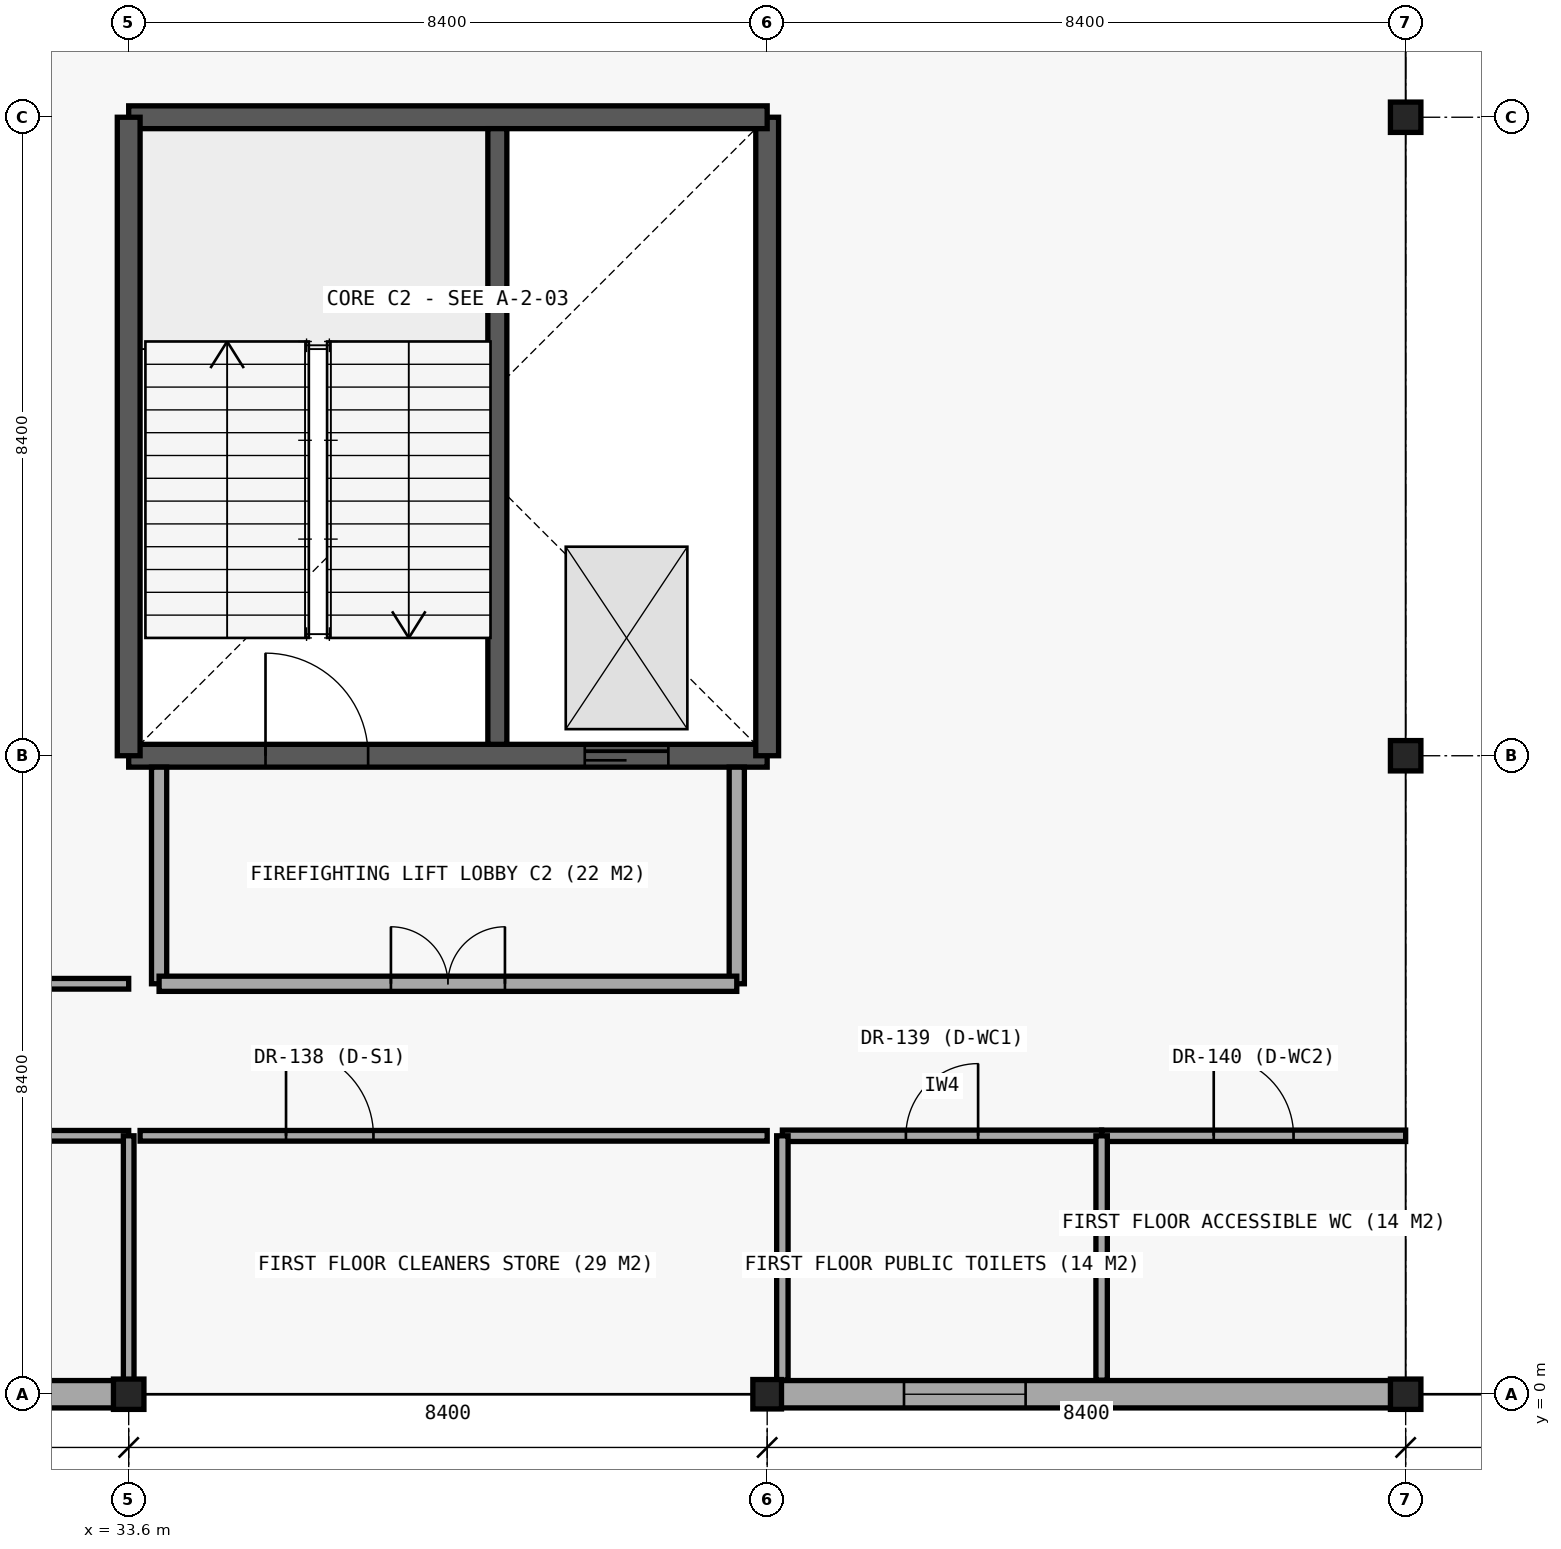
"""IFC4 building model, lengths in metres.
Left out: names, types, materials, properties, quantities, classifications, styles, units other than length and angle.
Written with IfcOpenShell. Run it as: python <this file> out.ifc"""

import sys

from ifc_helpers import new_model, si_unit, direction, frame, frame_2d, origin, origin_2d, place, context, subcontext, project, spatial, rectangle, i_section, extrude, element, fill, save


model = new_model("IFC4")
c1 = context("Model", 3, precision=1e-05, world=origin(), true_north=direction((0.0, 1.0)))
c2 = subcontext(c1, "Body", "Model", "MODEL_VIEW")
j1 = project(units=[si_unit("LENGTHUNIT", "METRE"), si_unit("PLANEANGLEUNIT", "RADIAN")], contexts=[c1])
p1 = place(None, origin())
s1 = spatial("IfcSite", under=j1, at=p1, CompositionType="ELEMENT")
p2 = place(p1, origin())
s2 = spatial("IfcBuilding", under=s1, at=p2, CompositionType="ELEMENT")
p3 = place(p2, frame((0.0, 0.0, 4.8)))
s3 = spatial("IfcBuildingStorey", under=s2, at=p3, CompositionType="ELEMENT", Elevation=4.8)
p4 = place(p3, frame((33.6, 8.4, 0.0), z_axis=(0.0, 0.0, 1.0), x_axis=(1.0, 0.0, 0.0)))
e1 = element("IfcWall", 1, at=p4, inside=s3, PredefinedType="SHEAR", context=c2, shape_type="SweptSolid", body=[
    extrude(rectangle(XDim=8.4, YDim=0.3, at=frame_2d((4.2, 0.0))), origin(), (0.0, 0.0, 1.0), 4.2),
])
p5 = place(p4, frame((1.8, 0.0, 0.0)))
e2 = element("IfcOpeningElement", 2, at=p5, cuts=e1, PredefinedType="OPENING", context=c2, shape_type="SweptSolid", body=[
    extrude(rectangle(XDim=1.35, YDim=2.2, at=frame_2d((0.675, 1.1))), frame((0.0, 0.16, 0.0), z_axis=(0.0, -1.0, 0.0), x_axis=(1.0, 0.0, 0.0)), (0.0, 0.0, 1.0), 0.32),
])
p6 = place(p4, frame((6.0, 0.0, 0.0)))
e3 = element("IfcOpeningElement", 3, at=p6, cuts=e1, PredefinedType="OPENING", context=c2, shape_type="SweptSolid", body=[
    extrude(rectangle(XDim=1.1, YDim=2.2, at=frame_2d((0.55, 1.1))), frame((0.0, 0.16, 0.0), z_axis=(0.0, -1.0, 0.0), x_axis=(1.0, 0.0, 0.0)), (0.0, 0.0, 1.0), 0.32),
])
p7 = place(p3, frame((42.0, 8.4, 0.0), z_axis=(0.0, 0.0, 1.0), x_axis=(0.0, 1.0, 0.0)))
e4 = element("IfcWall", 4, at=p7, inside=s3, PredefinedType="SHEAR", context=c2, shape_type="SweptSolid", body=[
    extrude(rectangle(XDim=8.4, YDim=0.3, at=frame_2d((4.2, 0.0))), origin(), (0.0, 0.0, 1.0), 4.2),
])
p8 = place(p3, frame((42.0, 16.8, 0.0), z_axis=(0.0, 0.0, 1.0), x_axis=(-1.0, 0.0, 0.0)))
e5 = element("IfcWall", 5, at=p8, inside=s3, PredefinedType="SHEAR", context=c2, shape_type="SweptSolid", body=[
    extrude(rectangle(XDim=8.4, YDim=0.3, at=frame_2d((4.2, 0.0))), origin(), (0.0, 0.0, 1.0), 4.2),
])
p9 = place(p3, frame((33.6, 16.8, 0.0), z_axis=(0.0, 0.0, 1.0), x_axis=(0.0, -1.0, 0.0)))
e6 = element("IfcWall", 6, at=p9, inside=s3, PredefinedType="SHEAR", context=c2, shape_type="SweptSolid", body=[
    extrude(rectangle(XDim=8.4, YDim=0.3, at=frame_2d((4.2, 0.0))), origin(), (0.0, 0.0, 1.0), 4.2),
])
p10 = place(p3, frame((38.45, 8.55, 0.0), z_axis=(0.0, 0.0, 1.0), x_axis=(0.0, 1.0, 0.0)))
e7 = element("IfcWall", 7, at=p10, inside=s3, PredefinedType="SHEAR", context=c2, shape_type="SweptSolid", body=[
    extrude(rectangle(XDim=8.1, YDim=0.25, at=frame_2d((4.05, 0.0))), origin(), (0.0, 0.0, 1.0), 4.2),
])
p11 = place(p3, frame((33.6, 0.0, 0.0), z_axis=(0.0, 0.0, 1.0), x_axis=(1.0, 0.0, 0.0)))
e8 = element("IfcColumn", 8, at=p11, inside=s3, PredefinedType="COLUMN", context=c2, shape_type="SweptSolid", body=[
    extrude(i_section(OverallWidth=0.401, OverallDepth=0.399, WebThickness=0.025, FlangeThickness=0.04, FilletRadius=0.015, at=origin_2d()), origin(), (0.0, 0.0, 1.0), 4.2),
])
p12 = place(p3, frame((42.0, 0.0, 0.0), z_axis=(0.0, 0.0, 1.0), x_axis=(1.0, 0.0, 0.0)))
e9 = element("IfcColumn", 9, at=p12, inside=s3, PredefinedType="COLUMN", context=c2, shape_type="SweptSolid", body=[
    extrude(i_section(OverallWidth=0.377, OverallDepth=0.387, WebThickness=0.022, FlangeThickness=0.036, FilletRadius=0.015, at=origin_2d()), origin(), (0.0, 0.0, 1.0), 4.2),
])
for number, where, z_axis, x_axis in (
    (10, (50.4, 0.0, 0.0), (0.0, 0.0, 1.0), (1.0, 0.0, 0.0)),
    (11, (50.4, 8.4, 0.0), (0.0, 0.0, 1.0), (1.0, 0.0, 0.0)),
    (12, (50.4, 16.8, 0.0), (0.0, 0.0, 1.0), (1.0, 0.0, 0.0)),
):
    element("IfcColumn", number, at=place(p3, frame(where, z_axis=z_axis, x_axis=x_axis)), inside=s3, PredefinedType="COLUMN", context=c2, shape_type="SweptSolid", body=[
        extrude(i_section(OverallWidth=0.401, OverallDepth=0.399, WebThickness=0.025, FlangeThickness=0.04, FilletRadius=0.015, at=origin_2d()), origin(), (0.0, 0.0, 1.0), 4.2),
    ])
p13 = place(p3, frame((25.2, 0.0, 0.0), z_axis=(0.0, 0.0, 1.0), x_axis=(1.0, 0.0, 0.0)))
e13 = element("IfcWall", 13, at=p13, inside=s3, PredefinedType="STANDARD", context=c2, shape_type="SweptSolid", body=[
    extrude(rectangle(XDim=8.4, YDim=0.36, at=frame_2d((4.2, 0.0))), origin(), (0.0, 0.0, 1.0), 3.62),
])
p14 = place(p3, frame((42.0, 0.0, 0.0), z_axis=(0.0, 0.0, 1.0), x_axis=(1.0, 0.0, 0.0)))
e14 = element("IfcWall", 14, at=p14, inside=s3, PredefinedType="STANDARD", context=c2, shape_type="SweptSolid", body=[
    extrude(rectangle(XDim=8.4, YDim=0.36, at=frame_2d((4.2, 0.0))), origin(), (0.0, 0.0, 1.0), 3.62),
])
p15 = place(p14, frame((1.8, 0.0, 0.85)))
e15 = element("IfcOpeningElement", 15, at=p15, cuts=e14, PredefinedType="OPENING", context=c2, shape_type="SweptSolid", body=[
    extrude(rectangle(XDim=1.6, YDim=2.5, at=frame_2d((0.8, 1.25))), frame((0.0, 0.19, 0.0), z_axis=(0.0, -1.0, 0.0), x_axis=(1.0, 0.0, 0.0)), (0.0, 0.0, 1.0), 0.38),
])
for number, where, z_axis, x_axis in (
    (16, (34.0, 5.4, 0.0), (0.0, 0.0, 1.0), (0.0, 1.0, 0.0)),
    (17, (41.6, 5.4, 0.0), (0.0, 0.0, 1.0), (0.0, 1.0, 0.0)),
):
    element("IfcWall", number, at=place(p3, frame(where, z_axis=z_axis, x_axis=x_axis)), inside=s3, PredefinedType="PARTITIONING", context=c2, shape_type="SweptSolid", body=[
        extrude(rectangle(XDim=2.85, YDim=0.2, at=frame_2d((1.425, 0.0))), origin(), (0.0, 0.0, 1.0), 3.49),
    ])
p16 = place(p3, frame((34.0, 5.4, 0.0), z_axis=(0.0, 0.0, 1.0), x_axis=(1.0, 0.0, 0.0)))
e18 = element("IfcWall", 18, at=p16, inside=s3, PredefinedType="PARTITIONING", context=c2, shape_type="SweptSolid", body=[
    extrude(rectangle(XDim=7.6, YDim=0.2, at=frame_2d((3.8, 0.0))), origin(), (0.0, 0.0, 1.0), 3.52),
])
p17 = place(p16, frame((3.05, 0.0, 0.0)))
e19 = element("IfcOpeningElement", 19, at=p17, cuts=e18, PredefinedType="OPENING", context=c2, shape_type="SweptSolid", body=[
    extrude(rectangle(XDim=1.5, YDim=2.2, at=frame_2d((0.75, 1.1))), frame((0.0, 0.11, 0.0), z_axis=(0.0, -1.0, 0.0), x_axis=(1.0, 0.0, 0.0)), (0.0, 0.0, 1.0), 0.22),
])
p18 = place(p3, frame((20.0, 3.4, 0.0), z_axis=(0.0, 0.0, 1.0), x_axis=(1.0, 0.0, 0.0)))
e20 = element("IfcWall", 20, at=p18, inside=s3, PredefinedType="PARTITIONING", context=c2, shape_type="SweptSolid", body=[
    extrude(rectangle(XDim=13.6, YDim=0.14, at=frame_2d((6.8, 0.0))), origin(), (0.0, 0.0, 1.0), 3.5),
])
p19 = place(p18, frame((7.52, 0.0, 0.0)))
e21 = element("IfcOpeningElement", 21, at=p19, cuts=e20, PredefinedType="OPENING", context=c2, shape_type="SweptSolid", body=[
    extrude(rectangle(XDim=1.0, YDim=2.15, at=frame_2d((0.5, 1.075))), frame((0.0, 0.08, 0.0), z_axis=(0.0, -1.0, 0.0), x_axis=(1.0, 0.0, 0.0)), (0.0, 0.0, 1.0), 0.16),
])
p20 = place(p3, frame((33.75, 3.4, 0.0), z_axis=(0.0, 0.0, 1.0), x_axis=(1.0, 0.0, 0.0)))
e22 = element("IfcWall", 22, at=p20, inside=s3, PredefinedType="PARTITIONING", context=c2, shape_type="SweptSolid", body=[
    extrude(rectangle(XDim=8.25, YDim=0.14, at=frame_2d((4.125, 0.0))), origin(), (0.0, 0.0, 1.0), 3.5),
])
p21 = place(p20, frame((1.92, 0.0, 0.0)))
e23 = element("IfcOpeningElement", 23, at=p21, cuts=e22, PredefinedType="OPENING", context=c2, shape_type="SweptSolid", body=[
    extrude(rectangle(XDim=1.15, YDim=2.15, at=frame_2d((0.575, 1.075))), frame((0.0, 0.08, 0.0), z_axis=(0.0, -1.0, 0.0), x_axis=(1.0, 0.0, 0.0)), (0.0, 0.0, 1.0), 0.16),
])
p22 = place(p3, frame((42.2, 3.4, 0.0), z_axis=(0.0, 0.0, 1.0), x_axis=(1.0, 0.0, 0.0)))
e24 = element("IfcWall", 24, at=p22, inside=s3, PredefinedType="PARTITIONING", context=c2, shape_type="SweptSolid", body=[
    extrude(rectangle(XDim=4.2, YDim=0.15, at=frame_2d((2.1, 0.0))), origin(), (0.0, 0.0, 1.0), 3.5),
])
p23 = place(p22, frame((1.625, 0.0, 0.0)))
e25 = element("IfcOpeningElement", 25, at=p23, cuts=e24, PredefinedType="OPENING", context=c2, shape_type="SweptSolid", body=[
    extrude(rectangle(XDim=0.95, YDim=2.1, at=frame_2d((0.475, 1.05))), frame((0.0, 0.085, 0.0), z_axis=(0.0, -1.0, 0.0), x_axis=(1.0, 0.0, 0.0)), (0.0, 0.0, 1.0), 0.17),
])
p24 = place(p3, frame((46.4, 3.4, 0.0), z_axis=(0.0, 0.0, 1.0), x_axis=(1.0, 0.0, 0.0)))
e26 = element("IfcWall", 26, at=p24, inside=s3, PredefinedType="PARTITIONING", context=c2, shape_type="SweptSolid", body=[
    extrude(rectangle(XDim=4.0, YDim=0.15, at=frame_2d((2.0, 0.0))), origin(), (0.0, 0.0, 1.0), 3.5),
])
p25 = place(p24, frame((1.475, 0.0, 0.0)))
e27 = element("IfcOpeningElement", 27, at=p25, cuts=e26, PredefinedType="OPENING", context=c2, shape_type="SweptSolid", body=[
    extrude(rectangle(XDim=1.05, YDim=2.15, at=frame_2d((0.525, 1.075))), frame((0.0, 0.085, 0.0), z_axis=(0.0, -1.0, 0.0), x_axis=(1.0, 0.0, 0.0)), (0.0, 0.0, 1.0), 0.17),
])
p26 = place(p3, frame((22.2, 5.4, 0.0), z_axis=(0.0, 0.0, 1.0), x_axis=(1.0, 0.0, 0.0)))
e28 = element("IfcWall", 28, at=p26, inside=s3, PredefinedType="PARTITIONING", context=c2, shape_type="SweptSolid", body=[
    extrude(rectangle(XDim=11.4, YDim=0.14, at=frame_2d((5.7, 0.0))), origin(), (0.0, 0.0, 1.0), 3.5),
])
p27 = place(p3, frame((33.6, 0.185, 0.0), z_axis=(0.0, 0.0, 1.0), x_axis=(0.0, 1.0, 0.0)))
e29 = element("IfcWall", 29, at=p27, inside=s3, PredefinedType="PARTITIONING", context=c2, shape_type="SweptSolid", body=[
    extrude(rectangle(XDim=3.215, YDim=0.14, at=frame_2d((1.607, 0.0))), origin(), (0.0, 0.0, 1.0), 3.49),
])
p28 = place(p3, frame((42.2, 0.185, 0.0), z_axis=(0.0, 0.0, 1.0), x_axis=(0.0, 1.0, 0.0)))
e30 = element("IfcWall", 30, at=p28, inside=s3, PredefinedType="PARTITIONING", context=c2, shape_type="SweptSolid", body=[
    extrude(rectangle(XDim=3.215, YDim=0.15, at=frame_2d((1.607, 0.0))), origin(), (0.0, 0.0, 1.0), 3.49),
])
p29 = place(p3, frame((46.4, 0.185, 0.0), z_axis=(0.0, 0.0, 1.0), x_axis=(0.0, 1.0, 0.0)))
e31 = element("IfcWall", 31, at=p29, inside=s3, PredefinedType="PARTITIONING", context=c2, shape_type="SweptSolid", body=[
    extrude(rectangle(XDim=3.215, YDim=0.15, at=frame_2d((1.607, 0.0))), origin(), (0.0, 0.0, 1.0), 3.5),
])
p30 = place(p15, origin())
e32 = element("IfcWindow", 32, at=p30, inside=s3, PartitioningType="SINGLE_PANEL", PredefinedType="WINDOW", context=c2, shape_type="SweptSolid", body=[
    extrude(rectangle(XDim=1.6, YDim=2.5, at=frame_2d((0.8, 1.25))), frame((0.0, 0.03, 0.0), z_axis=(0.0, -1.0, 0.0), x_axis=(1.0, 0.0, 0.0)), (0.0, 0.0, 1.0), 0.06),
])
fill(e15, e32)
p31 = place(p5, origin())
e33 = element("IfcDoor", 33, at=p31, inside=s3, OperationType="SINGLE_SWING_LEFT", PredefinedType="DOOR", context=c2, shape_type="SweptSolid", body=[
    extrude(rectangle(XDim=1.35, YDim=2.2, at=frame_2d((0.675, 1.1))), frame((0.0, 0.025, 0.0), z_axis=(0.0, -1.0, 0.0), x_axis=(1.0, 0.0, 0.0)), (0.0, 0.0, 1.0), 0.05),
])
fill(e2, e33)
p32 = place(p6, origin())
e34 = element("IfcDoor", 34, at=p32, inside=s3, OperationType="SLIDING_TO_LEFT", PredefinedType="DOOR", context=c2, shape_type="SweptSolid", body=[
    extrude(rectangle(XDim=1.1, YDim=2.2, at=frame_2d((0.55, 1.1))), frame((0.0, 0.025, 0.0), z_axis=(0.0, -1.0, 0.0), x_axis=(1.0, 0.0, 0.0)), (0.0, 0.0, 1.0), 0.05),
])
fill(e3, e34)
p33 = place(p17, origin())
e35 = element("IfcDoor", 35, at=p33, inside=s3, OperationType="DOUBLE_DOOR_SINGLE_SWING", PredefinedType="DOOR", context=c2, shape_type="SweptSolid", body=[
    extrude(rectangle(XDim=1.5, YDim=2.2, at=frame_2d((0.75, 1.1))), frame((0.0, 0.025, 0.0), z_axis=(0.0, -1.0, 0.0), x_axis=(1.0, 0.0, 0.0)), (0.0, 0.0, 1.0), 0.05),
])
fill(e19, e35)
p34 = place(p21, origin())
e36 = element("IfcDoor", 36, at=p34, inside=s3, OperationType="SINGLE_SWING_LEFT", PredefinedType="DOOR", context=c2, shape_type="SweptSolid", body=[
    extrude(rectangle(XDim=1.15, YDim=2.15, at=frame_2d((0.575, 1.075))), frame((0.0, 0.025, 0.0), z_axis=(0.0, -1.0, 0.0), x_axis=(1.0, 0.0, 0.0)), (0.0, 0.0, 1.0), 0.05),
])
fill(e23, e36)
p35 = place(p23, origin())
e37 = element("IfcDoor", 37, at=p35, inside=s3, OperationType="SINGLE_SWING_RIGHT", PredefinedType="DOOR", context=c2, shape_type="SweptSolid", body=[
    extrude(rectangle(XDim=0.95, YDim=2.1, at=frame_2d((0.475, 1.05))), frame((0.0, 0.025, 0.0), z_axis=(0.0, -1.0, 0.0), x_axis=(1.0, 0.0, 0.0)), (0.0, 0.0, 1.0), 0.05),
])
fill(e25, e37)
p36 = place(p25, origin())
e38 = element("IfcDoor", 38, at=p36, inside=s3, OperationType="SINGLE_SWING_LEFT", PredefinedType="DOOR", context=c2, shape_type="SweptSolid", body=[
    extrude(rectangle(XDim=1.05, YDim=2.15, at=frame_2d((0.525, 1.075))), frame((0.0, 0.025, 0.0), z_axis=(0.0, -1.0, 0.0), x_axis=(1.0, 0.0, 0.0)), (0.0, 0.0, 1.0), 0.05),
])
fill(e27, e38)
save(model, sys.argv[1])
